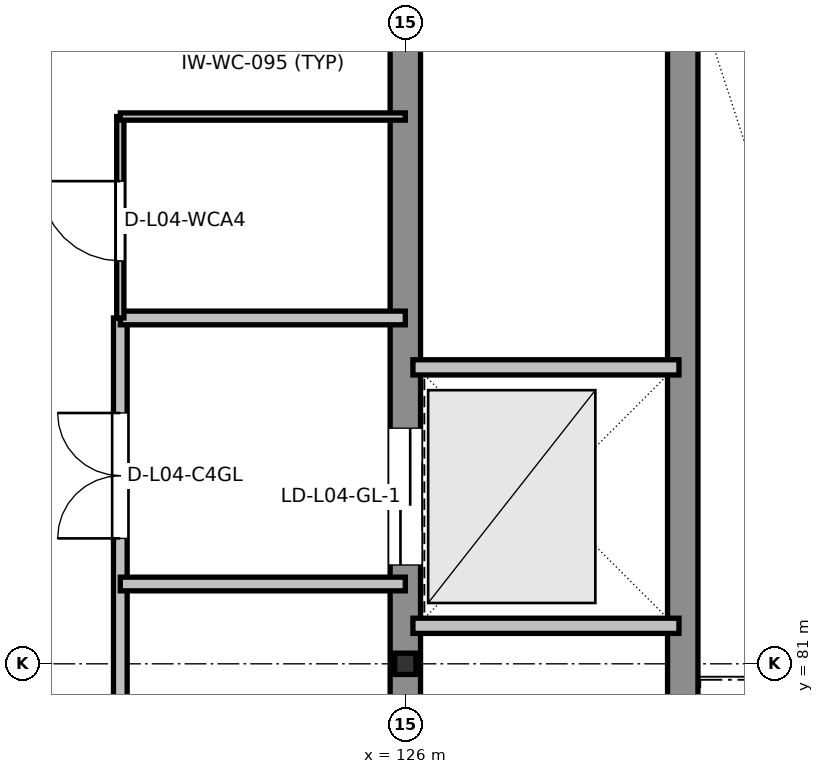
"""IFC4 building model, lengths in metres.
Left out: names, types, materials, properties, quantities, classifications, styles, units other than length and angle.
Written with IfcOpenShell. Run it as: python <this file> out.ifc"""

import sys

from ifc_helpers import new_model, si_unit, direction, frame, frame_2d, origin, origin_2d, place, context, subcontext, project, spatial, rectangle, i_section, extrude, element, fill, save


model = new_model("IFC4")
c1 = context("Model", 3, precision=1e-05, world=origin(), true_north=direction((0.0, 1.0)))
c2 = subcontext(c1, "Body", "Model", "MODEL_VIEW")
j1 = project(units=[si_unit("LENGTHUNIT", "METRE"), si_unit("PLANEANGLEUNIT", "RADIAN")], contexts=[c1])
p1 = place(None, origin())
s1 = spatial("IfcSite", under=j1, at=p1, CompositionType="ELEMENT")
p2 = place(p1, origin())
s2 = spatial("IfcBuilding", under=s1, at=p2, CompositionType="ELEMENT")
p3 = place(p2, frame((0.0, 0.0, 19.2)))
s3 = spatial("IfcBuildingStorey", under=s2, at=p3, CompositionType="ELEMENT", Elevation=19.2)
p4 = place(p3, frame((126.0, 81.0, 0.0), z_axis=(0.0, 0.0, 1.0), x_axis=(1.0, 0.0, 0.0)))
e1 = element("IfcColumn", 1, at=p4, inside=s3, PredefinedType="COLUMN", context=c2, shape_type="SweptSolid", body=[
    extrude(i_section(OverallWidth=0.28, OverallDepth=0.28, WebThickness=0.01, FlangeThickness=0.018, at=origin_2d()), origin(), (0.0, 0.0, 1.0), 4.2),
])
p5 = place(p3, frame((126.0, 90.0, 0.0), z_axis=(0.0, 0.0, 1.0), x_axis=(0.0, -1.0, 0.0)))
e2 = element("IfcWall", 2, at=p5, inside=s3, PredefinedType="SHEAR", context=c2, shape_type="SweptSolid", body=[
    extrude(rectangle(XDim=18.0, YDim=0.4, at=frame_2d((9.0, 0.0))), origin(), (0.0, 0.0, 1.0), 3.96),
])
p6 = place(p5, frame((16.1, 0.0, 0.0)))
e3 = element("IfcOpeningElement", 3, at=p6, cuts=e2, PredefinedType="OPENING", context=c2, shape_type="SweptSolid", body=[
    extrude(rectangle(XDim=1.1, YDim=2.16, at=frame_2d((0.55, 1.08))), frame((0.0, 0.21, 0.0), z_axis=(0.0, -1.0, 0.0), x_axis=(1.0, 0.0, 0.0)), (0.0, 0.0, 1.0), 0.42),
])
p7 = place(p5, frame((13.45, 0.0, 0.0)))
e4 = element("IfcOpeningElement", 4, at=p7, cuts=e2, PredefinedType="OPENING", context=c2, shape_type="SweptSolid", body=[
    extrude(rectangle(XDim=1.2, YDim=2.2, at=frame_2d((0.6, 1.1))), frame((0.0, 0.21, 0.0), z_axis=(0.0, -1.0, 0.0), x_axis=(1.0, 0.0, 0.0)), (0.0, 0.0, 1.0), 0.42),
])
p8 = place(p5, frame((10.65, 0.0, 0.0)))
e5 = element("IfcOpeningElement", 5, at=p8, cuts=e2, PredefinedType="OPENING", context=c2, shape_type="SweptSolid", body=[
    extrude(rectangle(XDim=1.2, YDim=2.2, at=frame_2d((0.6, 1.1))), frame((0.0, 0.21, 0.0), z_axis=(0.0, -1.0, 0.0), x_axis=(1.0, 0.0, 0.0)), (0.0, 0.0, 1.0), 0.42),
])
p9 = place(p5, frame((5.9, 0.0, 0.0)))
e6 = element("IfcOpeningElement", 6, at=p9, cuts=e2, PredefinedType="OPENING", context=c2, shape_type="SweptSolid", body=[
    extrude(rectangle(XDim=1.8, YDim=2.35, at=frame_2d((0.9, 1.175))), frame((0.0, 0.21, 0.0), z_axis=(0.0, -1.0, 0.0), x_axis=(1.0, 0.0, 0.0)), (0.0, 0.0, 1.0), 0.42),
])
p10 = place(p3, frame((129.65, 72.0, 0.0), z_axis=(0.0, 0.0, 1.0), x_axis=(0.0, 1.0, 0.0)))
e7 = element("IfcWall", 7, at=p10, inside=s3, PredefinedType="SHEAR", context=c2, shape_type="SweptSolid", body=[
    extrude(rectangle(XDim=18.0, YDim=0.4, at=frame_2d((9.0, 0.0))), origin(), (0.0, 0.0, 1.0), 3.96),
])
p11 = place(p10, frame((0.7, 0.0, 0.0)))
e8 = element("IfcOpeningElement", 8, at=p11, cuts=e7, PredefinedType="OPENING", context=c2, shape_type="SweptSolid", body=[
    extrude(rectangle(XDim=1.1, YDim=2.16, at=frame_2d((0.55, 1.08))), frame((0.0, 0.21, 0.0), z_axis=(0.0, -1.0, 0.0), x_axis=(1.0, 0.0, 0.0)), (0.0, 0.0, 1.0), 0.42),
])
for number, where, z_axis, x_axis in (
    (9, (126.1, 81.5, 0.0), (0.0, 0.0, 1.0), (1.0, 0.0, 0.0)),
    (10, (126.1, 84.9, 0.0), (0.0, 0.0, 1.0), (1.0, 0.0, 0.0)),
):
    element("IfcWall", number, at=place(p3, frame(where, z_axis=z_axis, x_axis=x_axis)), inside=s3, PredefinedType="PARTITIONING", context=c2, shape_type="SweptSolid", body=[
        extrude(rectangle(XDim=3.5, YDim=0.2, at=frame_2d((1.75, 0.0))), origin(), (0.0, 0.0, 1.0), 3.96),
    ])
p12 = place(p3, frame((122.25, 72.0, 0.0), z_axis=(0.0, 0.0, 1.0), x_axis=(0.0, 1.0, 0.0)))
e11 = element("IfcWall", 11, at=p12, inside=s3, PredefinedType="PARTITIONING", context=c2, shape_type="SweptSolid", body=[
    extrude(rectangle(XDim=13.55, YDim=0.18, at=frame_2d((6.775, 0.0))), origin(), (0.0, 0.0, 1.0), 3.96),
])
p13 = place(p12, frame((0.75, 0.0, 0.0)))
e12 = element("IfcOpeningElement", 12, at=p13, cuts=e11, PredefinedType="OPENING", context=c2, shape_type="SweptSolid", body=[
    extrude(rectangle(XDim=1.1, YDim=2.16, at=frame_2d((0.55, 1.08))), frame((0.0, 0.1, 0.0), z_axis=(0.0, -1.0, 0.0), x_axis=(1.0, 0.0, 0.0)), (0.0, 0.0, 1.0), 0.2),
])
p14 = place(p12, frame((3.2, 0.0, 0.0)))
e13 = element("IfcOpeningElement", 13, at=p14, cuts=e11, PredefinedType="OPENING", context=c2, shape_type="SweptSolid", body=[
    extrude(rectangle(XDim=1.4, YDim=2.2, at=frame_2d((0.7, 1.1))), frame((0.0, 0.1, 0.0), z_axis=(0.0, -1.0, 0.0), x_axis=(1.0, 0.0, 0.0)), (0.0, 0.0, 1.0), 0.2),
])
p15 = place(p12, frame((6.65, 0.0, 0.0)))
e14 = element("IfcOpeningElement", 14, at=p15, cuts=e11, PredefinedType="OPENING", context=c2, shape_type="SweptSolid", body=[
    extrude(rectangle(XDim=1.4, YDim=2.2, at=frame_2d((0.7, 1.1))), frame((0.0, 0.1, 0.0), z_axis=(0.0, -1.0, 0.0), x_axis=(1.0, 0.0, 0.0)), (0.0, 0.0, 1.0), 0.2),
])
p16 = place(p12, frame((10.65, 0.0, 0.0)))
e15 = element("IfcOpeningElement", 15, at=p16, cuts=e11, PredefinedType="OPENING", context=c2, shape_type="SweptSolid", body=[
    extrude(rectangle(XDim=1.65, YDim=2.25, at=frame_2d((0.825, 1.125))), frame((0.0, 0.1, 0.0), z_axis=(0.0, -1.0, 0.0), x_axis=(1.0, 0.0, 0.0)), (0.0, 0.0, 1.0), 0.2),
])
for number, where, z_axis, x_axis in (
    (16, (122.25, 82.05, 0.0), (0.0, 0.0, 1.0), (1.0, 0.0, 0.0)),
    (17, (122.25, 85.55, 0.0), (0.0, 0.0, 1.0), (1.0, 0.0, 0.0)),
):
    element("IfcWall", number, at=place(p3, frame(where, z_axis=z_axis, x_axis=x_axis)), inside=s3, PredefinedType="PARTITIONING", context=c2, shape_type="SweptSolid", body=[
        extrude(rectangle(XDim=3.75, YDim=0.18, at=frame_2d((1.875, 0.0))), origin(), (0.0, 0.0, 1.0), 3.96),
    ])
p17 = place(p3, frame((122.25, 85.55, 0.0), z_axis=(0.0, 0.0, 1.0), x_axis=(0.0, 1.0, 0.0)))
e18 = element("IfcWall", 18, at=p17, inside=s3, PredefinedType="PARTITIONING", context=c2, shape_type="SweptSolid", body=[
    extrude(rectangle(XDim=2.65, YDim=0.095, at=frame_2d((1.325, 0.0))), origin(), (0.0, 0.0, 1.0), 3.96),
])
p18 = place(p17, frame((0.75, 0.0, 0.0)))
e19 = element("IfcOpeningElement", 19, at=p18, cuts=e18, PredefinedType="OPENING", context=c2, shape_type="SweptSolid", body=[
    extrude(rectangle(XDim=1.05, YDim=2.13, at=frame_2d((0.525, 1.065))), frame((0.0, 0.057, 0.0), z_axis=(0.0, -1.0, 0.0), x_axis=(1.0, 0.0, 0.0)), (0.0, 0.0, 1.0), 0.115),
])
p19 = place(p3, frame((122.25, 88.2, 0.0), z_axis=(0.0, 0.0, 1.0), x_axis=(1.0, 0.0, 0.0)))
e20 = element("IfcWall", 20, at=p19, inside=s3, PredefinedType="PARTITIONING", context=c2, shape_type="SweptSolid", body=[
    extrude(rectangle(XDim=3.75, YDim=0.095, at=frame_2d((1.875, 0.0))), origin(), (0.0, 0.0, 1.0), 3.96),
])
p20 = place(p9, origin())
e21 = element("IfcDoor", 21, at=p20, inside=s3, OperationType="DOUBLE_DOOR_SLIDING", PredefinedType="DOOR", context=c2, shape_type="SweptSolid", body=[
    extrude(rectangle(XDim=1.8, YDim=2.35, at=frame_2d((0.9, 1.175))), frame((0.0, 0.025, 0.0), z_axis=(0.0, -1.0, 0.0), x_axis=(1.0, 0.0, 0.0)), (0.0, 0.0, 1.0), 0.05),
])
fill(e6, e21)
p21 = place(p16, origin())
e22 = element("IfcDoor", 22, at=p21, inside=s3, OperationType="DOUBLE_DOOR_SINGLE_SWING", PredefinedType="DOOR", context=c2, shape_type="SweptSolid", body=[
    extrude(rectangle(XDim=1.65, YDim=2.25, at=frame_2d((0.825, 1.125))), frame((0.0, 0.025, 0.0), z_axis=(0.0, -1.0, 0.0), x_axis=(1.0, 0.0, 0.0)), (0.0, 0.0, 1.0), 0.05),
])
fill(e15, e22)
p22 = place(p18, origin())
e23 = element("IfcDoor", 23, at=p22, inside=s3, OperationType="SINGLE_SWING_RIGHT", PredefinedType="DOOR", context=c2, shape_type="SweptSolid", body=[
    extrude(rectangle(XDim=1.05, YDim=2.13, at=frame_2d((0.525, 1.065))), frame((0.0, 0.025, 0.0), z_axis=(0.0, -1.0, 0.0), x_axis=(1.0, 0.0, 0.0)), (0.0, 0.0, 1.0), 0.05),
])
fill(e19, e23)
save(model, sys.argv[1])
